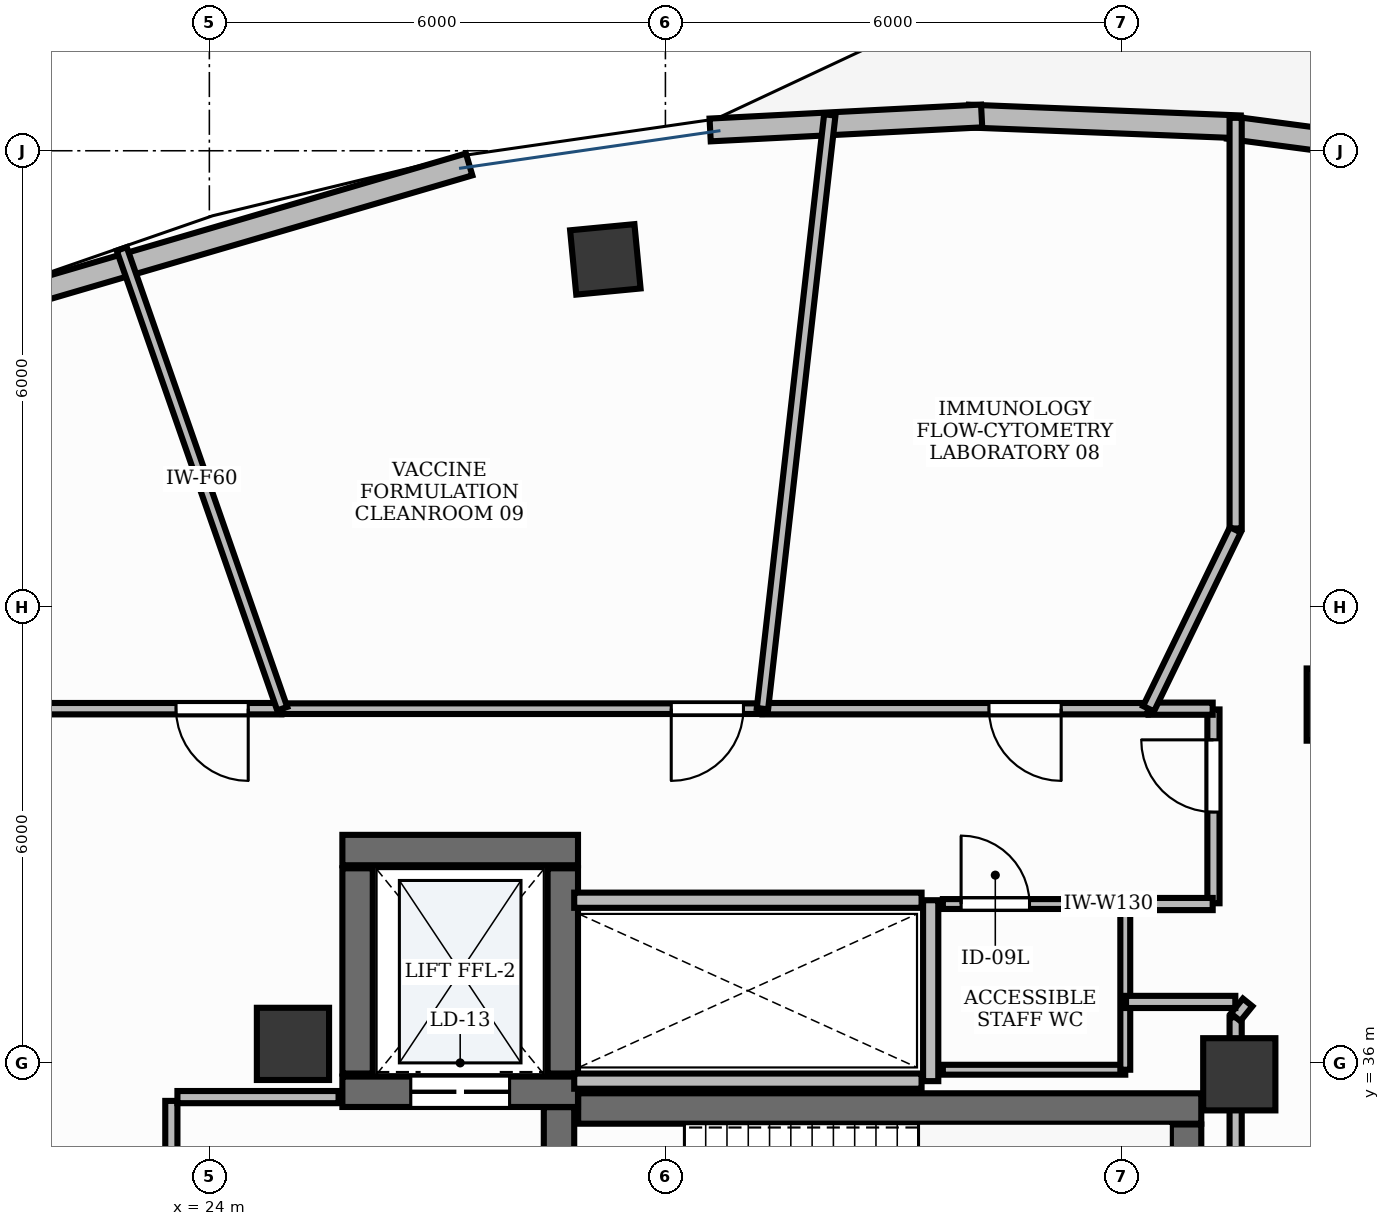
"""IFC4 building model, lengths in metres.
Left out: names, types, materials, properties, quantities, classifications, styles, units other than length and angle.
Written with IfcOpenShell. Run it as: python <this file> out.ifc"""

import sys

from ifc_helpers import new_model, si_unit, direction, frame, frame_2d, origin, origin_2d, place, context, subcontext, project, spatial, rectangle, extrude, element, fill, save


model = new_model("IFC4")
c1 = context("Model", 3, precision=1e-05, world=origin(), true_north=direction((0.0, 1.0)))
c2 = subcontext(c1, "Body", "Model", "MODEL_VIEW")
j1 = project(units=[si_unit("LENGTHUNIT", "METRE"), si_unit("PLANEANGLEUNIT", "RADIAN")], contexts=[c1])
p1 = place(None, origin())
s1 = spatial("IfcSite", under=j1, at=p1, CompositionType="ELEMENT")
p2 = place(p1, origin())
s2 = spatial("IfcBuilding", under=s1, at=p2, CompositionType="ELEMENT")
p3 = place(p2, frame((0.0, 0.0, 247.8)))
s3 = spatial("IfcBuildingStorey", under=s2, at=p3, CompositionType="ELEMENT", Elevation=247.8)
p4 = place(p3, frame((28.852, 35.4, 0.0), z_axis=(0.0, 0.0, 1.0), x_axis=(1.0, 0.0, 0.0)))
e1 = element("IfcWall", 1, at=p4, inside=s3, PredefinedType="SHEAR", context=c2, shape_type="SweptSolid", body=[
    extrude(rectangle(XDim=8.198, YDim=0.4, at=frame_2d((4.099, 0.0))), origin(), (0.0, 0.0, 1.0), 3.9),
])
p5 = place(p3, frame((36.85, 32.11, 0.0), z_axis=(0.0, 0.0, 1.0), x_axis=(0.0, 1.0, 0.0)))
e2 = element("IfcWall", 2, at=p5, inside=s3, PredefinedType="SHEAR", context=c2, shape_type="SweptSolid", body=[
    extrude(rectangle(XDim=3.08, YDim=0.4, at=frame_2d((1.54, 0.0))), origin(), (0.0, 0.0, 1.0), 3.9),
])
p6 = place(p3, frame((28.6, 32.11, 0.0), z_axis=(0.0, 0.0, 1.0), x_axis=(0.0, 1.0, 0.0)))
e3 = element("IfcWall", 3, at=p6, inside=s3, PredefinedType="SHEAR", context=c2, shape_type="SweptSolid", body=[
    extrude(rectangle(XDim=3.308, YDim=0.4, at=frame_2d((1.654, 0.0))), origin(), (0.0, 0.0, 1.0), 3.9),
])
p7 = place(p6, frame((0.2, 0.0, 0.0)))
e4 = element("IfcOpeningElement", 4, at=p7, cuts=e3, PredefinedType="OPENING", context=c2, shape_type="SweptSolid", body=[
    extrude(rectangle(XDim=1.05, YDim=2.15, at=frame_2d((0.525, 1.075))), frame((0.0, 0.215, 0.0), z_axis=(0.0, -1.0, 0.0), x_axis=(1.0, 0.0, 0.0)), (0.0, 0.0, 1.0), 0.43),
])
p8 = place(p3, frame((25.75, 38.8, 0.0), z_axis=(0.0, 0.0, 1.0), x_axis=(1.0, 0.0, 0.0)))
e5 = element("IfcWall", 5, at=p8, inside=s3, PredefinedType="SHEAR", context=c2, shape_type="SweptSolid", body=[
    extrude(rectangle(XDim=3.1, YDim=0.4, at=frame_2d((1.55, 0.0))), origin(), (0.0, 0.0, 1.0), 3.9),
])
p9 = place(p3, frame((25.75, 35.62, 0.0), z_axis=(0.0, 0.0, 1.0), x_axis=(1.0, 0.0, 0.0)))
e6 = element("IfcWall", 6, at=p9, inside=s3, PredefinedType="SHEAR", context=c2, shape_type="SweptSolid", body=[
    extrude(rectangle(XDim=3.1, YDim=0.4, at=frame_2d((1.55, 0.0))), origin(), (0.0, 0.0, 1.0), 3.9),
])
p10 = place(p9, frame((0.9, 0.0, 0.0)))
e7 = element("IfcOpeningElement", 7, at=p10, cuts=e6, PredefinedType="OPENING", context=c2, shape_type="SweptSolid", body=[
    extrude(rectangle(XDim=1.3, YDim=2.2, at=frame_2d((0.65, 1.1))), frame((0.0, 0.215, 0.0), z_axis=(0.0, -1.0, 0.0), x_axis=(1.0, 0.0, 0.0)), (0.0, 0.0, 1.0), 0.43),
])
for number, where, z_axis, x_axis in (
    (8, (25.95, 35.86, 0.0), (0.0, 0.0, 1.0), (0.0, 1.0, 0.0)),
    (9, (28.65, 35.86, 0.0), (0.0, 0.0, 1.0), (0.0, 1.0, 0.0)),
):
    element("IfcWall", number, at=place(p3, frame(where, z_axis=z_axis, x_axis=x_axis)), inside=s3, PredefinedType="SHEAR", context=c2, shape_type="SweptSolid", body=[
        extrude(rectangle(XDim=2.7, YDim=0.4, at=frame_2d((1.35, 0.0))), origin(), (0.0, 0.0, 1.0), 3.9),
    ])
for number, where, z_axis, x_axis in (
    (10, (37.55, 35.85, -0.0), (0.0, 0.0, 1.0), (1.0, 0.0, 0.0)),
    (11, (25.1, 36.25, -0.0), (0.0, 0.0, 1.0), (1.0, 0.0, 0.0)),
):
    element("IfcColumn", number, at=place(p3, frame(where, z_axis=z_axis, x_axis=x_axis)), inside=s3, PredefinedType="PILASTER", context=c2, shape_type="SweptSolid", body=[
        extrude(rectangle(XDim=0.95, YDim=0.95, at=origin_2d()), origin(), (0.0, 0.0, 1.0), 3.901),
    ])
p11 = place(p3, frame((38.911, 40.714, -0.0), z_axis=(0.0, 0.0, 1.0), x_axis=(1.0, 0.0, 0.0)))
e12 = element("IfcColumn", 12, at=p11, inside=s3, PredefinedType="COLUMN", context=c2, shape_type="SweptSolid", body=[
    extrude(rectangle(XDim=0.95, YDim=0.95, at=origin_2d()), origin(), (0.0, 0.0, 1.0), 3.901),
])
p12 = place(p3, frame((29.21, 46.571, -0.0), z_axis=(0.0, 0.0, 1.0), x_axis=(0.995462868748, 0.095150811579, 0.0)))
e13 = element("IfcColumn", 13, at=p12, inside=s3, PredefinedType="COLUMN", context=c2, shape_type="SweptSolid", body=[
    extrude(rectangle(XDim=0.85, YDim=0.85, at=origin_2d()), origin(), (0.0, 0.0, 1.0), 3.901),
])
p13 = place(p3, frame((40.896, 47.845, 0.0), z_axis=(0.0, 0.0, 1.0), x_axis=(-0.991363126073, 0.131145538481, 0.0)))
e14 = element("IfcWall", 14, at=p13, inside=s3, PredefinedType="STANDARD", context=c2, shape_type="SweptSolid", body=[
    extrude(rectangle(XDim=3.518, YDim=0.3, at=frame_2d((1.759, 0.0))), origin(), (0.0, 0.0, 1.0), 3.47),
])
p14 = place(p13, frame((1.209, 0.0, 0.0)))
e15 = element("IfcOpeningElement", 15, at=p14, cuts=e14, PredefinedType="OPENING", context=c2, shape_type="SweptSolid", body=[
    extrude(rectangle(XDim=1.1, YDim=2.15, at=frame_2d((0.55, 1.075))), frame((0.0, 0.165, 0.0), z_axis=(0.0, -1.0, 0.0), x_axis=(1.0, 0.0, 0.0)), (0.0, 0.0, 1.0), 0.33),
])
p15 = place(p3, frame((37.563, 48.314, 0.0), z_axis=(0.0, 0.0, 1.0), x_axis=(-0.999208461954, 0.039780014567, 0.0)))
e16 = element("IfcWall", 16, at=p15, inside=s3, PredefinedType="STANDARD", context=c2, shape_type="SweptSolid", body=[
    extrude(rectangle(XDim=3.578, YDim=0.3, at=frame_2d((1.789, 0.0))), origin(), (0.0, 0.0, 1.0), 3.9),
])
p16 = place(p3, frame((34.16, 48.458, 0.0), z_axis=(0.0, 0.0, 1.0), x_axis=(-0.998671230657, -0.051534193093, 0.0)))
e17 = element("IfcWall", 17, at=p16, inside=s3, PredefinedType="STANDARD", context=c2, shape_type="SweptSolid", body=[
    extrude(rectangle(XDim=3.577, YDim=0.3, at=frame_2d((1.788, 0.0))), origin(), (0.0, 0.0, 1.0), 3.47),
])
p17 = place(p3, frame((27.418, 47.82, 0.0), z_axis=(0.0, 0.0, 1.0), x_axis=(-0.959675502853, -0.281110172749, 0.0)))
e18 = element("IfcWall", 18, at=p17, inside=s3, PredefinedType="STANDARD", context=c2, shape_type="SweptSolid", body=[
    extrude(rectangle(XDim=6.797, YDim=0.3, at=frame_2d((3.398, 0.0))), origin(), (0.0, 0.0, 1.0), 3.9),
])
p18 = place(p3, frame((33.49, 35.76, 0.0), z_axis=(0.0, 0.0, 1.0), x_axis=(0.0, 1.0, 0.0)))
e19 = element("IfcWall", 19, at=p18, inside=s3, PredefinedType="PARTITIONING", context=c2, shape_type="SweptSolid", body=[
    extrude(rectangle(XDim=2.38, YDim=0.2, at=frame_2d((1.19, 0.0))), origin(), (0.0, 0.0, 1.0), 2.91),
])
for number, where, z_axis, x_axis in (
    (20, (28.8, 35.76, 0.0), (0.0, 0.0, 1.0), (1.0, 0.0, 0.0)),
    (21, (28.8, 38.14, 0.0), (0.0, 0.0, 1.0), (1.0, 0.0, 0.0)),
):
    element("IfcWall", number, at=place(p3, frame(where, z_axis=z_axis, x_axis=x_axis)), inside=s3, PredefinedType="PARTITIONING", context=c2, shape_type="SweptSolid", body=[
        extrude(rectangle(XDim=4.57, YDim=0.2, at=frame_2d((2.285, 0.0))), origin(), (0.0, 0.0, 1.0), 2.91),
    ])
p19 = place(p3, frame((23.5, 32.1, 0.0), z_axis=(0.0, 0.0, 1.0), x_axis=(0.0, 1.0, 0.0)))
e22 = element("IfcWall", 22, at=p19, inside=s3, PredefinedType="PARTITIONING", context=c2, shape_type="SweptSolid", body=[
    extrude(rectangle(XDim=3.4, YDim=0.16, at=frame_2d((1.7, 0.0))), origin(), (0.0, 0.0, 1.0), 2.91),
])
p20 = place(p19, frame((1.175, 0.0, 0.0)))
e23 = element("IfcOpeningElement", 23, at=p20, cuts=e22, PredefinedType="OPENING", context=c2, shape_type="SweptSolid", body=[
    extrude(rectangle(XDim=1.05, YDim=2.15, at=frame_2d((0.525, 1.075))), frame((0.0, 0.095, 0.0), z_axis=(0.0, -1.0, 0.0), x_axis=(1.0, 0.0, 0.0)), (0.0, 0.0, 1.0), 0.19),
])
p21 = place(p3, frame((23.58, 35.55, 0.0), z_axis=(0.0, 0.0, 1.0), x_axis=(1.0, 0.0, 0.0)))
e24 = element("IfcWall", 24, at=p21, inside=s3, PredefinedType="PARTITIONING", context=c2, shape_type="SweptSolid", body=[
    extrude(rectangle(XDim=2.12, YDim=0.16, at=frame_2d((1.06, 0.0))), origin(), (0.0, 0.0, 1.0), 2.91),
])
p22 = place(p3, frame((33.65, 38.09, 0.0), z_axis=(0.0, 0.0, 1.0), x_axis=(1.0, 0.0, 0.0)))
e25 = element("IfcWall", 25, at=p22, inside=s3, PredefinedType="PARTITIONING", context=c2, shape_type="SweptSolid", body=[
    extrude(rectangle(XDim=2.4, YDim=0.13, at=frame_2d((1.2, 0.0))), origin(), (0.0, 0.0, 1.0), 2.91),
])
p23 = place(p22, frame((0.24, 0.0, 0.0)))
e26 = element("IfcOpeningElement", 26, at=p23, cuts=e25, PredefinedType="OPENING", context=c2, shape_type="SweptSolid", body=[
    extrude(rectangle(XDim=0.9, YDim=2.15, at=frame_2d((0.45, 1.075))), frame((0.0, 0.08, 0.0), z_axis=(0.0, -1.0, 0.0), x_axis=(1.0, 0.0, 0.0)), (0.0, 0.0, 1.0), 0.16),
])
p24 = place(p3, frame((37.21, 38.1, 0.0), z_axis=(0.0, 0.0, 1.0), x_axis=(0.0, 1.0, 0.0)))
e27 = element("IfcWall", 27, at=p24, inside=s3, PredefinedType="PARTITIONING", context=c2, shape_type="SweptSolid", body=[
    extrude(rectangle(XDim=2.55, YDim=0.16, at=frame_2d((1.275, 0.0))), origin(), (0.0, 0.0, 1.0), 2.91),
])
p25 = place(p24, frame((1.2, 0.0, 0.0)))
e28 = element("IfcOpeningElement", 28, at=p25, cuts=e27, PredefinedType="OPENING", context=c2, shape_type="SweptSolid", body=[
    extrude(rectangle(XDim=0.95, YDim=2.15, at=frame_2d((0.475, 1.075))), frame((0.0, 0.095, 0.0), z_axis=(0.0, -1.0, 0.0), x_axis=(1.0, 0.0, 0.0)), (0.0, 0.0, 1.0), 0.19),
])
p26 = place(p3, frame((36.346, 40.66, 0.0), z_axis=(0.0, 0.0, 1.0), x_axis=(-1.0, 0.0, 0.0)))
e29 = element("IfcWall", 29, at=p26, inside=s3, PredefinedType="PARTITIONING", context=c2, shape_type="SweptSolid", body=[
    extrude(rectangle(XDim=5.07, YDim=0.15, at=frame_2d((2.535, 0.0))), origin(), (0.0, 0.0, 1.0), 2.91),
])
p27 = place(p26, frame((1.14, 0.0, 0.0)))
e30 = element("IfcOpeningElement", 30, at=p27, cuts=e29, PredefinedType="OPENING", context=c2, shape_type="SweptSolid", body=[
    extrude(rectangle(XDim=0.95, YDim=2.15, at=frame_2d((0.475, 1.075))), frame((0.0, 0.09, 0.0), z_axis=(0.0, -1.0, 0.0), x_axis=(1.0, 0.0, 0.0)), (0.0, 0.0, 1.0), 0.18),
])
p28 = place(p3, frame((31.267, 40.66, 0.0), z_axis=(0.0, 0.0, 1.0), x_axis=(-1.0, 0.0, 0.0)))
e31 = element("IfcWall", 31, at=p28, inside=s3, PredefinedType="PARTITIONING", context=c2, shape_type="SweptSolid", body=[
    extrude(rectangle(XDim=6.308, YDim=0.14, at=frame_2d((3.154, 0.0))), origin(), (0.0, 0.0, 1.0), 2.91),
])
p29 = place(p28, frame((0.24, 0.0, 0.0)))
e32 = element("IfcOpeningElement", 32, at=p29, cuts=e31, PredefinedType="OPENING", context=c2, shape_type="SweptSolid", body=[
    extrude(rectangle(XDim=0.95, YDim=2.15, at=frame_2d((0.475, 1.075))), frame((0.0, 0.085, 0.0), z_axis=(0.0, -1.0, 0.0), x_axis=(1.0, 0.0, 0.0)), (0.0, 0.0, 1.0), 0.17),
])
p30 = place(p3, frame((24.948, 40.66, 0.0), z_axis=(0.0, 0.0, 1.0), x_axis=(-1.0, 0.0, 0.0)))
e33 = element("IfcWall", 33, at=p30, inside=s3, PredefinedType="PARTITIONING", context=c2, shape_type="SweptSolid", body=[
    extrude(rectangle(XDim=3.198, YDim=0.15, at=frame_2d((1.599, 0.0))), origin(), (0.0, 0.0, 1.0), 2.91),
])
p31 = place(p30, frame((0.437, 0.0, 0.0)))
e34 = element("IfcOpeningElement", 34, at=p31, cuts=e33, PredefinedType="OPENING", context=c2, shape_type="SweptSolid", body=[
    extrude(rectangle(XDim=0.95, YDim=2.15, at=frame_2d((0.475, 1.075))), frame((0.0, 0.09, 0.0), z_axis=(0.0, -1.0, 0.0), x_axis=(1.0, 0.0, 0.0)), (0.0, 0.0, 1.0), 0.18),
])
p32 = place(p3, frame((36.05, 35.91, 0.0), z_axis=(0.0, 0.0, 1.0), x_axis=(-1.0, 0.0, 0.0)))
e35 = element("IfcWall", 35, at=p32, inside=s3, PredefinedType="PARTITIONING", context=c2, shape_type="SweptSolid", body=[
    extrude(rectangle(XDim=2.4, YDim=0.13, at=frame_2d((1.2, 0.0))), origin(), (0.0, 0.0, 1.0), 2.91),
])
p33 = place(p3, frame((36.05, 38.09, 0.0), z_axis=(0.0, 0.0, 1.0), x_axis=(0.0, -1.0, 0.0)))
e36 = element("IfcWall", 36, at=p33, inside=s3, PredefinedType="PARTITIONING", context=c2, shape_type="SweptSolid", body=[
    extrude(rectangle(XDim=2.18, YDim=0.13, at=frame_2d((1.09, 0.0))), origin(), (0.0, 0.0, 1.0), 2.91),
])
p34 = place(p3, frame((37.502, 43.031, 0.0), z_axis=(0.0, 0.0, 1.0), x_axis=(0.0, 1.0, 0.0)))
e37 = element("IfcWall", 37, at=p34, inside=s3, PredefinedType="PARTITIONING", context=c2, shape_type="SweptSolid", body=[
    extrude(rectangle(XDim=5.403, YDim=0.16, at=frame_2d((2.701, 0.0))), origin(), (0.0, 0.0, 1.0), 2.91),
])
p35 = place(p3, frame((37.502, 30.676, 0.0), z_axis=(0.0, 0.0, 1.0), x_axis=(0.0, 1.0, 0.0)))
e38 = element("IfcWall", 38, at=p35, inside=s3, PredefinedType="PARTITIONING", context=c2, shape_type="SweptSolid", body=[
    extrude(rectangle(XDim=5.924, YDim=0.16, at=frame_2d((2.962, 0.0))), origin(), (0.0, 0.0, 1.0), 2.91),
])
p36 = place(p3, frame((37.502, 36.601, 0.0), z_axis=(0.0, 0.0, 1.0), x_axis=(0.629198228668, 0.777244870707, 0.0)))
e39 = element("IfcWall", 39, at=p36, inside=s3, PredefinedType="PARTITIONING", context=c2, shape_type="SweptSolid", body=[
    extrude(rectangle(XDim=0.251, YDim=0.16, at=frame_2d((0.125, 0.0))), origin(), (0.0, 0.0, 1.0), 2.91),
])
p37 = place(p3, frame((37.498, 36.802, 0.0), z_axis=(0.0, 0.0, 1.0), x_axis=(-1.0, 0.0, 0.0)))
e40 = element("IfcWall", 40, at=p37, inside=s3, PredefinedType="PARTITIONING", context=c2, shape_type="SweptSolid", body=[
    extrude(rectangle(XDim=1.438, YDim=0.16, at=frame_2d((0.719, 0.0))), origin(), (0.0, 0.0, 1.0), 2.91),
])
p38 = place(p3, frame((36.06, 38.09, 0.0), z_axis=(0.0, 0.0, 1.0), x_axis=(1.0, 0.0, 0.0)))
e41 = element("IfcWall", 41, at=p38, inside=s3, PredefinedType="PARTITIONING", context=c2, shape_type="SweptSolid", body=[
    extrude(rectangle(XDim=1.14, YDim=0.16, at=frame_2d((0.57, 0.0))), origin(), (0.0, 0.0, 1.0), 2.91),
])
p39 = place(p3, frame((37.2, 40.66, 0.0), z_axis=(0.0, 0.0, 1.0), x_axis=(-1.0, 0.0, 0.0)))
e42 = element("IfcWall", 42, at=p39, inside=s3, PredefinedType="PARTITIONING", context=c2, shape_type="SweptSolid", body=[
    extrude(rectangle(XDim=0.844, YDim=0.16, at=frame_2d((0.422, 0.0))), origin(), (0.0, 0.0, 1.0), 2.91),
])
p40 = place(p3, frame((36.356, 40.66, 0.0), z_axis=(0.0, 0.0, 1.0), x_axis=(0.436465870706, 0.899720814314, 0.0)))
e43 = element("IfcWall", 43, at=p40, inside=s3, PredefinedType="PARTITIONING", context=c2, shape_type="SweptSolid", body=[
    extrude(rectangle(XDim=2.615, YDim=0.16, at=frame_2d((1.308, 0.0))), origin(), (0.0, 0.0, 1.0), 2.91),
])
p41 = place(p3, frame((31.277, 40.66, 0.0), z_axis=(0.0, 0.0, 1.0), x_axis=(0.112701338023, 0.993628908802, 0.0)))
e44 = element("IfcWall", 44, at=p41, inside=s3, PredefinedType="PARTITIONING", context=c2, shape_type="SweptSolid", body=[
    extrude(rectangle(XDim=7.861, YDim=0.15, at=frame_2d((3.931, 0.0))), origin(), (0.0, 0.0, 1.0), 2.91),
])
p42 = place(p3, frame((24.959, 40.66, 0.0), z_axis=(0.0, 0.0, 1.0), x_axis=(-0.329537269445, 0.944142567649, 0.0)))
e45 = element("IfcWall", 45, at=p42, inside=s3, PredefinedType="PARTITIONING", context=c2, shape_type="SweptSolid", body=[
    extrude(rectangle(XDim=6.407, YDim=0.14, at=frame_2d((3.204, 0.0))), origin(), (0.0, 0.0, 1.0), 2.91),
])
p43 = place(p10, origin())
e46 = element("IfcDoor", 46, at=p43, inside=s3, OperationType="DOUBLE_DOOR_SLIDING", PredefinedType="DOOR", context=c2, shape_type="SweptSolid", body=[
    extrude(rectangle(XDim=1.3, YDim=2.2, at=frame_2d((0.65, 1.1))), frame((0.0, 0.025, 0.0), z_axis=(0.0, -1.0, 0.0), x_axis=(1.0, 0.0, 0.0)), (0.0, 0.0, 1.0), 0.05),
])
fill(e7, e46)
p44 = place(p23, origin())
e47 = element("IfcDoor", 47, at=p44, inside=s3, OperationType="SINGLE_SWING_LEFT", PredefinedType="DOOR", context=c2, shape_type="SweptSolid", body=[
    extrude(rectangle(XDim=0.9, YDim=2.15, at=frame_2d((0.45, 1.075))), frame((0.0, 0.025, 0.0), z_axis=(0.0, -1.0, 0.0), x_axis=(1.0, 0.0, 0.0)), (0.0, 0.0, 1.0), 0.05),
])
fill(e26, e47)
p45 = place(p25, origin())
e48 = element("IfcDoor", 48, at=p45, inside=s3, OperationType="SINGLE_SWING_RIGHT", PredefinedType="DOOR", context=c2, shape_type="SweptSolid", body=[
    extrude(rectangle(XDim=0.95, YDim=2.15, at=frame_2d((0.475, 1.075))), frame((0.0, 0.025, 0.0), z_axis=(0.0, -1.0, 0.0), x_axis=(1.0, 0.0, 0.0)), (0.0, 0.0, 1.0), 0.05),
])
fill(e28, e48)
p46 = place(p27, origin())
e49 = element("IfcDoor", 49, at=p46, inside=s3, OperationType="SINGLE_SWING_LEFT", PredefinedType="DOOR", context=c2, shape_type="SweptSolid", body=[
    extrude(rectangle(XDim=0.95, YDim=2.15, at=frame_2d((0.475, 1.075))), frame((0.0, 0.025, 0.0), z_axis=(0.0, -1.0, 0.0), x_axis=(1.0, 0.0, 0.0)), (0.0, 0.0, 1.0), 0.05),
])
fill(e30, e49)
p47 = place(p29, origin())
e50 = element("IfcDoor", 50, at=p47, inside=s3, OperationType="SINGLE_SWING_RIGHT", PredefinedType="DOOR", context=c2, shape_type="SweptSolid", body=[
    extrude(rectangle(XDim=0.95, YDim=2.15, at=frame_2d((0.475, 1.075))), frame((0.0, 0.025, 0.0), z_axis=(0.0, -1.0, 0.0), x_axis=(1.0, 0.0, 0.0)), (0.0, 0.0, 1.0), 0.05),
])
fill(e32, e50)
p48 = place(p31, origin())
e51 = element("IfcDoor", 51, at=p48, inside=s3, OperationType="SINGLE_SWING_LEFT", PredefinedType="DOOR", context=c2, shape_type="SweptSolid", body=[
    extrude(rectangle(XDim=0.95, YDim=2.15, at=frame_2d((0.475, 1.075))), frame((0.0, 0.025, 0.0), z_axis=(0.0, -1.0, 0.0), x_axis=(1.0, 0.0, 0.0)), (0.0, 0.0, 1.0), 0.05),
])
fill(e34, e51)
save(model, sys.argv[1])
